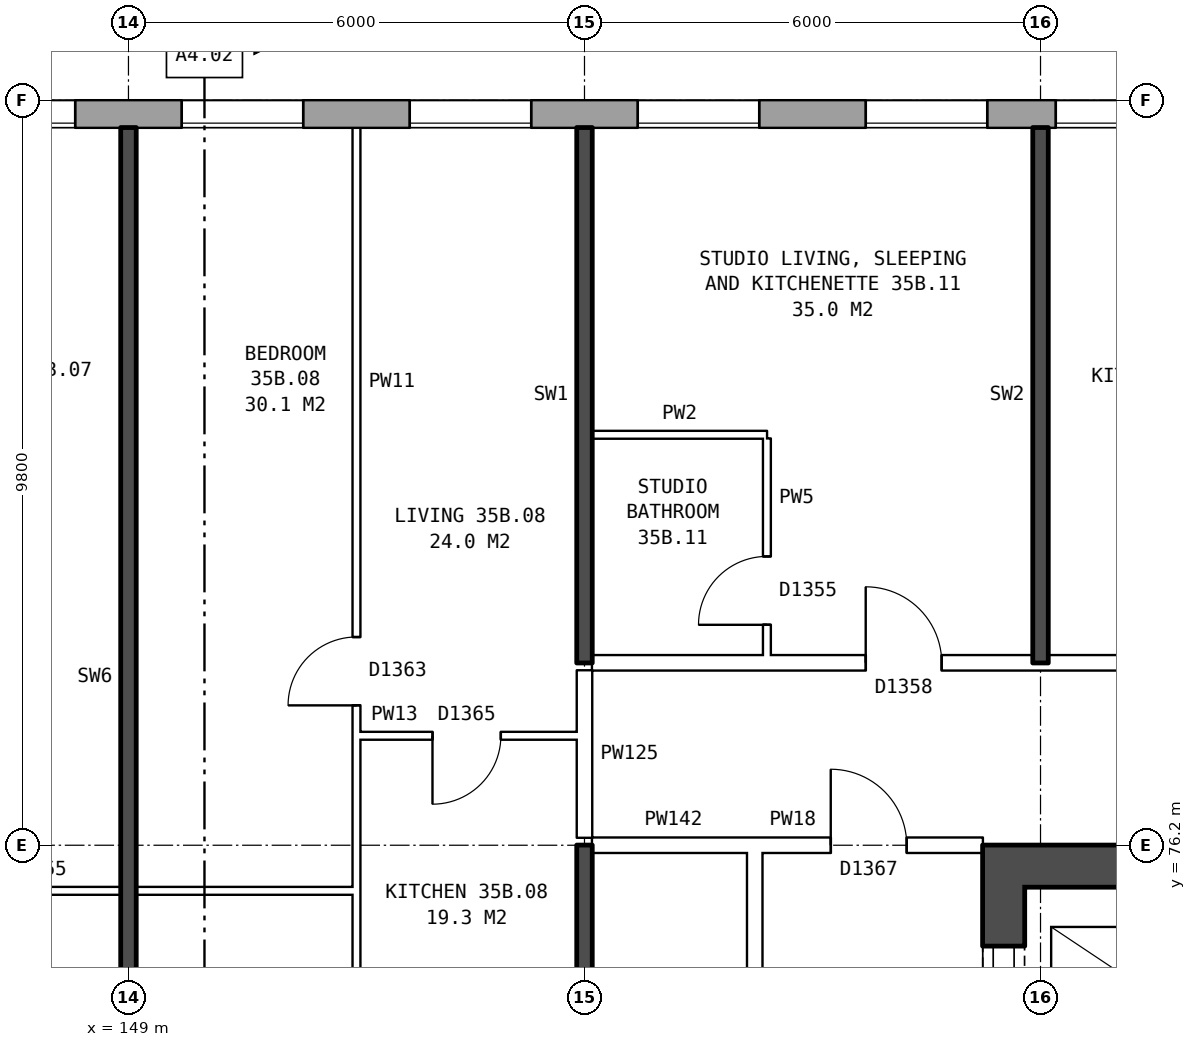
"""IFC4 building model, lengths in metres.
Left out: names, types, materials, properties, quantities, classifications, styles, units other than length and angle.
Written with IfcOpenShell. Run it as: python <this file> out.ifc"""

import sys

from ifc_helpers import new_model, si_unit, direction, frame, frame_2d, origin, place, context, subcontext, project, spatial, rectangle, extrude, element, fill, save


model = new_model("IFC4")
c1 = context("Model", 3, precision=1e-05, world=origin(), true_north=direction((0.0, 1.0)))
c2 = subcontext(c1, "Body", "Model", "MODEL_VIEW")
j1 = project(units=[si_unit("LENGTHUNIT", "METRE"), si_unit("PLANEANGLEUNIT", "RADIAN")], contexts=[c1])
p1 = place(None, origin())
s1 = spatial("IfcSite", under=j1, at=p1, CompositionType="ELEMENT")
p2 = place(p1, origin())
s2 = spatial("IfcBuilding", under=s1, at=p2, CompositionType="ELEMENT")
p3 = place(p2, frame((0.0, 0.0, 126.8)))
s3 = spatial("IfcBuildingStorey", under=s2, at=p3, CompositionType="ELEMENT", Elevation=126.8)
p4 = place(p3, frame((169.675, 85.82, 0.0), z_axis=(0.0, 0.0, 1.0), x_axis=(-1.0, 0.0, 0.0)))
e1 = element("IfcWall", 1, at=p4, inside=s3, PredefinedType="STANDARD", context=c2, shape_type="SweptSolid", body=[
    extrude(rectangle(XDim=35.601, YDim=0.36, at=frame_2d((17.8, 0.0))), origin(), (0.0, 0.0, 1.0), 2.85),
])
p5 = place(p4, frame((0.375, 0.0, 0.8)))
e2 = element("IfcOpeningElement", 2, at=p5, cuts=e1, PredefinedType="OPENING", context=c2, shape_type="SweptSolid", body=[
    extrude(rectangle(XDim=1.6, YDim=1.8, at=frame_2d((0.8, 0.9))), frame((0.0, 0.19, 0.0), z_axis=(0.0, -1.0, 0.0), x_axis=(1.0, 0.0, 0.0)), (0.0, 0.0, 1.0), 0.38),
])
p6 = place(p4, frame((2.875, 0.0, 0.8)))
e3 = element("IfcOpeningElement", 3, at=p6, cuts=e1, PredefinedType="OPENING", context=c2, shape_type="SweptSolid", body=[
    extrude(rectangle(XDim=1.0, YDim=1.8, at=frame_2d((0.5, 0.9))), frame((0.0, 0.19, 0.0), z_axis=(0.0, -1.0, 0.0), x_axis=(1.0, 0.0, 0.0)), (0.0, 0.0, 1.0), 0.38),
])
p7 = place(p4, frame((4.175, 0.0, 1.6)))
e4 = element("IfcOpeningElement", 4, at=p7, cuts=e1, PredefinedType="OPENING", context=c2, shape_type="SweptSolid", body=[
    extrude(rectangle(XDim=0.6, YDim=0.9, at=frame_2d((0.3, 0.45))), frame((0.0, 0.19, 0.0), z_axis=(0.0, -1.0, 0.0), x_axis=(1.0, 0.0, 0.0)), (0.0, 0.0, 1.0), 0.38),
])
p8 = place(p4, frame((9.375, 0.0, 0.8)))
e5 = element("IfcOpeningElement", 5, at=p8, cuts=e1, PredefinedType="OPENING", context=c2, shape_type="SweptSolid", body=[
    extrude(rectangle(XDim=1.6, YDim=1.8, at=frame_2d((0.8, 0.9))), frame((0.0, 0.19, 0.0), z_axis=(0.0, -1.0, 0.0), x_axis=(1.0, 0.0, 0.0)), (0.0, 0.0, 1.0), 0.38),
])
p9 = place(p4, frame((12.375, 0.0, 0.8)))
e6 = element("IfcOpeningElement", 6, at=p9, cuts=e1, PredefinedType="OPENING", context=c2, shape_type="SweptSolid", body=[
    extrude(rectangle(XDim=1.6, YDim=1.8, at=frame_2d((0.8, 0.9))), frame((0.0, 0.19, 0.0), z_axis=(0.0, -1.0, 0.0), x_axis=(1.0, 0.0, 0.0)), (0.0, 0.0, 1.0), 0.38),
])
p10 = place(p4, frame((15.375, 0.0, 0.8)))
e7 = element("IfcOpeningElement", 7, at=p10, cuts=e1, PredefinedType="OPENING", context=c2, shape_type="SweptSolid", body=[
    extrude(rectangle(XDim=1.6, YDim=1.8, at=frame_2d((0.8, 0.9))), frame((0.0, 0.19, 0.0), z_axis=(0.0, -1.0, 0.0), x_axis=(1.0, 0.0, 0.0)), (0.0, 0.0, 1.0), 0.38),
])
p11 = place(p4, frame((18.375, 0.0, 0.8)))
e8 = element("IfcOpeningElement", 8, at=p11, cuts=e1, PredefinedType="OPENING", context=c2, shape_type="SweptSolid", body=[
    extrude(rectangle(XDim=1.6, YDim=1.8, at=frame_2d((0.8, 0.9))), frame((0.0, 0.19, 0.0), z_axis=(0.0, -1.0, 0.0), x_axis=(1.0, 0.0, 0.0)), (0.0, 0.0, 1.0), 0.38),
])
p12 = place(p4, frame((21.375, 0.0, 0.8)))
e9 = element("IfcOpeningElement", 9, at=p12, cuts=e1, PredefinedType="OPENING", context=c2, shape_type="SweptSolid", body=[
    extrude(rectangle(XDim=1.6, YDim=1.8, at=frame_2d((0.8, 0.9))), frame((0.0, 0.19, 0.0), z_axis=(0.0, -1.0, 0.0), x_axis=(1.0, 0.0, 0.0)), (0.0, 0.0, 1.0), 0.38),
])
p13 = place(p4, frame((24.375, 0.0, 0.8)))
e10 = element("IfcOpeningElement", 10, at=p13, cuts=e1, PredefinedType="OPENING", context=c2, shape_type="SweptSolid", body=[
    extrude(rectangle(XDim=1.6, YDim=1.8, at=frame_2d((0.8, 0.9))), frame((0.0, 0.19, 0.0), z_axis=(0.0, -1.0, 0.0), x_axis=(1.0, 0.0, 0.0)), (0.0, 0.0, 1.0), 0.38),
])
p14 = place(p4, frame((27.375, 0.0, 0.8)))
e11 = element("IfcOpeningElement", 11, at=p14, cuts=e1, PredefinedType="OPENING", context=c2, shape_type="SweptSolid", body=[
    extrude(rectangle(XDim=1.6, YDim=1.8, at=frame_2d((0.8, 0.9))), frame((0.0, 0.19, 0.0), z_axis=(0.0, -1.0, 0.0), x_axis=(1.0, 0.0, 0.0)), (0.0, 0.0, 1.0), 0.38),
])
p15 = place(p4, frame((30.675, 0.0, 1.7)))
e12 = element("IfcOpeningElement", 12, at=p15, cuts=e1, PredefinedType="OPENING", context=c2, shape_type="SweptSolid", body=[
    extrude(rectangle(XDim=0.6, YDim=0.9, at=frame_2d((0.3, 0.45))), frame((0.0, 0.19, 0.0), z_axis=(0.0, -1.0, 0.0), x_axis=(1.0, 0.0, 0.0)), (0.0, 0.0, 1.0), 0.38),
])
p16 = place(p4, frame((33.375, 0.0, 0.8)))
e13 = element("IfcOpeningElement", 13, at=p16, cuts=e1, PredefinedType="OPENING", context=c2, shape_type="SweptSolid", body=[
    extrude(rectangle(XDim=1.6, YDim=1.8, at=frame_2d((0.8, 0.9))), frame((0.0, 0.19, 0.0), z_axis=(0.0, -1.0, 0.0), x_axis=(1.0, 0.0, 0.0)), (0.0, 0.0, 1.0), 0.38),
])
p17 = place(p4, frame((5.975, 0.0, 0.8)))
e14 = element("IfcOpeningElement", 14, at=p17, cuts=e1, PredefinedType="OPENING", context=c2, shape_type="SweptSolid", body=[
    extrude(rectangle(XDim=0.6, YDim=0.9, at=frame_2d((0.3, 0.45))), frame((0.0, 0.19, 0.0), z_axis=(0.0, -1.0, 0.0), x_axis=(1.0, 0.0, 0.0)), (0.0, 0.0, 1.0), 0.38),
])
p18 = place(p4, frame((6.875, 0.0, 0.8)))
e15 = element("IfcOpeningElement", 15, at=p18, cuts=e1, PredefinedType="OPENING", context=c2, shape_type="SweptSolid", body=[
    extrude(rectangle(XDim=1.6, YDim=1.8, at=frame_2d((0.8, 0.9))), frame((0.0, 0.19, 0.0), z_axis=(0.0, -1.0, 0.0), x_axis=(1.0, 0.0, 0.0)), (0.0, 0.0, 1.0), 0.38),
])
p19 = place(p4, frame((31.575, 0.0, 0.8)))
e16 = element("IfcOpeningElement", 16, at=p19, cuts=e1, PredefinedType="OPENING", context=c2, shape_type="SweptSolid", body=[
    extrude(rectangle(XDim=0.8, YDim=1.8, at=frame_2d((0.4, 0.9))), frame((0.0, 0.19, 0.0), z_axis=(0.0, -1.0, 0.0), x_axis=(1.0, 0.0, 0.0)), (0.0, 0.0, 1.0), 0.38),
])
p20 = place(p3, frame((160.515, 76.2, 0.0), z_axis=(0.0, 0.0, 1.0), x_axis=(0.0, -1.0, 0.0)))
e17 = element("IfcWall", 17, at=p20, inside=s3, PredefinedType="SHEAR", context=c2, shape_type="SweptSolid", body=[
    extrude(rectangle(XDim=12.4, YDim=0.55, at=frame_2d((6.2, 0.0))), origin(), (0.0, 0.0, 1.0), 2.85),
])
p21 = place(p20, frame((1.325, 0.0, 0.0)))
e18 = element("IfcOpeningElement", 18, at=p21, cuts=e17, PredefinedType="OPENING", context=c2, shape_type="SweptSolid", body=[
    extrude(rectangle(XDim=1.1, YDim=2.1, at=frame_2d((0.55, 1.05))), frame((0.0, 0.285, 0.0), z_axis=(0.0, -1.0, 0.0), x_axis=(1.0, 0.0, 0.0)), (0.0, 0.0, 1.0), 0.57),
])
p22 = place(p20, frame((3.825, 0.0, 0.0)))
e19 = element("IfcOpeningElement", 19, at=p22, cuts=e17, PredefinedType="OPENING", context=c2, shape_type="SweptSolid", body=[
    extrude(rectangle(XDim=0.85, YDim=2.1, at=frame_2d((0.425, 1.05))), frame((0.0, 0.285, 0.0), z_axis=(0.0, -1.0, 0.0), x_axis=(1.0, 0.0, 0.0)), (0.0, 0.0, 1.0), 0.57),
])
p23 = place(p20, frame((5.975, 0.0, 0.0)))
e20 = element("IfcOpeningElement", 20, at=p23, cuts=e17, PredefinedType="OPENING", context=c2, shape_type="SweptSolid", body=[
    extrude(rectangle(XDim=0.85, YDim=2.1, at=frame_2d((0.425, 1.05))), frame((0.0, 0.285, 0.0), z_axis=(0.0, -1.0, 0.0), x_axis=(1.0, 0.0, 0.0)), (0.0, 0.0, 1.0), 0.57),
])
p24 = place(p20, frame((9.9, 0.0, 0.0)))
e21 = element("IfcOpeningElement", 21, at=p24, cuts=e17, PredefinedType="OPENING", context=c2, shape_type="SweptSolid", body=[
    extrude(rectangle(XDim=1.1, YDim=2.1, at=frame_2d((0.55, 1.05))), frame((0.0, 0.285, 0.0), z_axis=(0.0, -1.0, 0.0), x_axis=(1.0, 0.0, 0.0)), (0.0, 0.0, 1.0), 0.57),
])
p25 = place(p20, frame((8.125, 0.0, 0.0)))
e22 = element("IfcOpeningElement", 22, at=p25, cuts=e17, PredefinedType="OPENING", context=c2, shape_type="SweptSolid", body=[
    extrude(rectangle(XDim=0.85, YDim=2.1, at=frame_2d((0.425, 1.05))), frame((0.0, 0.285, 0.0), z_axis=(0.0, -1.0, 0.0), x_axis=(1.0, 0.0, 0.0)), (0.0, 0.0, 1.0), 0.57),
])
p26 = place(p3, frame((160.79, 75.925, 0.0), z_axis=(0.0, 0.0, 1.0), x_axis=(1.0, 0.0, 0.0)))
e23 = element("IfcWall", 23, at=p26, inside=s3, PredefinedType="SHEAR", context=c2, shape_type="SweptSolid", body=[
    extrude(rectangle(XDim=7.3, YDim=0.55, at=frame_2d((3.65, 0.0))), origin(), (0.0, 0.0, 1.0), 2.85),
])
p27 = place(p3, frame((157.24, 63.9, 0.0), z_axis=(0.0, 0.0, 1.0), x_axis=(0.0, 1.0, 0.0)))
e24 = element("IfcWall", 24, at=p27, inside=s3, PredefinedType="PARTITIONING", context=c2, shape_type="SweptSolid", body=[
    extrude(rectangle(XDim=12.2, YDim=0.2, at=frame_2d((6.1, 0.0))), origin(), (0.0, 0.0, 1.0), 2.85),
])
p28 = place(p27, frame((5.1, 0.0, 0.0)))
e25 = element("IfcOpeningElement", 25, at=p28, cuts=e24, PredefinedType="OPENING", context=c2, shape_type="SweptSolid", body=[
    extrude(rectangle(XDim=2.0, YDim=2.1, at=frame_2d((1.0, 1.05))), frame((0.0, 0.11, 0.0), z_axis=(0.0, -1.0, 0.0), x_axis=(1.0, 0.0, 0.0)), (0.0, 0.0, 1.0), 0.22),
])
p29 = place(p3, frame((146.0, 75.6, 0.0), z_axis=(0.0, 0.0, 1.0), x_axis=(1.0, 0.0, 0.0)))
e26 = element("IfcWall", 26, at=p29, inside=s3, PredefinedType="PARTITIONING", context=c2, shape_type="SweptSolid", body=[
    extrude(rectangle(XDim=6.0, YDim=0.1, at=frame_2d((3.0, 0.0))), origin(), (0.0, 0.0, 1.0), 2.85),
])
p30 = place(p3, frame((155.1, 76.2, 0.0), z_axis=(0.0, 0.0, 1.0), x_axis=(1.0, 0.0, 0.0)))
e27 = element("IfcWall", 27, at=p30, inside=s3, PredefinedType="PARTITIONING", context=c2, shape_type="SweptSolid", body=[
    extrude(rectangle(XDim=2.14, YDim=0.2, at=frame_2d((1.07, 0.0))), origin(), (0.0, 0.0, 1.0), 2.85),
])
p31 = place(p3, frame((157.24, 76.2, 0.0), z_axis=(0.0, 0.0, 1.0), x_axis=(1.0, 0.0, 0.0)))
e28 = element("IfcWall", 28, at=p31, inside=s3, PredefinedType="PARTITIONING", context=c2, shape_type="SweptSolid", body=[
    extrude(rectangle(XDim=3.0, YDim=0.2, at=frame_2d((1.5, 0.0))), origin(), (0.0, 0.0, 1.0), 2.85),
])
p32 = place(p31, frame((1.0, 0.0, 0.0)))
e29 = element("IfcOpeningElement", 29, at=p32, cuts=e28, PredefinedType="OPENING", context=c2, shape_type="SweptSolid", body=[
    extrude(rectangle(XDim=1.0, YDim=2.1, at=frame_2d((0.5, 1.05))), frame((0.0, 0.11, 0.0), z_axis=(0.0, -1.0, 0.0), x_axis=(1.0, 0.0, 0.0)), (0.0, 0.0, 1.0), 0.22),
])
p33 = place(p3, frame((152.0, 77.64, 0.0), z_axis=(0.0, 0.0, 1.0), x_axis=(1.0, 0.0, 0.0)))
e30 = element("IfcWall", 30, at=p33, inside=s3, PredefinedType="PARTITIONING", context=c2, shape_type="SweptSolid", body=[
    extrude(rectangle(XDim=2.9, YDim=0.1, at=frame_2d((1.45, 0.0))), origin(), (0.0, 0.0, 1.0), 2.85),
])
p34 = place(p33, frame((1.0, 0.0, 0.0)))
e31 = element("IfcOpeningElement", 31, at=p34, cuts=e30, PredefinedType="OPENING", context=c2, shape_type="SweptSolid", body=[
    extrude(rectangle(XDim=0.9, YDim=2.1, at=frame_2d((0.45, 1.05))), frame((0.0, 0.06, 0.0), z_axis=(0.0, -1.0, 0.0), x_axis=(1.0, 0.0, 0.0)), (0.0, 0.0, 1.0), 0.12),
])
p35 = place(p3, frame((155.1, 78.6, 0.0), z_axis=(0.0, 0.0, 1.0), x_axis=(1.0, 0.0, 0.0)))
e32 = element("IfcWall", 32, at=p35, inside=s3, PredefinedType="PARTITIONING", context=c2, shape_type="SweptSolid", body=[
    extrude(rectangle(XDim=17.29, YDim=0.2, at=frame_2d((8.645, 0.0))), origin(), (0.0, 0.0, 1.0), 2.85),
])
p36 = place(p35, frame((3.6, 0.0, 0.0)))
e33 = element("IfcOpeningElement", 33, at=p36, cuts=e32, PredefinedType="OPENING", context=c2, shape_type="SweptSolid", body=[
    extrude(rectangle(XDim=1.0, YDim=2.1, at=frame_2d((0.5, 1.05))), frame((0.0, 0.11, 0.0), z_axis=(0.0, -1.0, 0.0), x_axis=(1.0, 0.0, 0.0)), (0.0, 0.0, 1.0), 0.22),
])
p37 = place(p35, frame((8.4, 0.0, 0.0)))
e34 = element("IfcOpeningElement", 34, at=p37, cuts=e32, PredefinedType="OPENING", context=c2, shape_type="SweptSolid", body=[
    extrude(rectangle(XDim=1.0, YDim=2.1, at=frame_2d((0.5, 1.05))), frame((0.0, 0.11, 0.0), z_axis=(0.0, -1.0, 0.0), x_axis=(1.0, 0.0, 0.0)), (0.0, 0.0, 1.0), 0.22),
])
p38 = place(p3, frame((155.1, 81.6, 0.0), z_axis=(0.0, 0.0, 1.0), x_axis=(1.0, 0.0, 0.0)))
e35 = element("IfcWall", 35, at=p38, inside=s3, PredefinedType="PARTITIONING", context=c2, shape_type="SweptSolid", body=[
    extrude(rectangle(XDim=2.3, YDim=0.1, at=frame_2d((1.15, 0.0))), origin(), (0.0, 0.0, 1.0), 2.85),
])
p39 = place(p3, frame((149.0, 71.2, 0.0), z_axis=(0.0, 0.0, 1.0), x_axis=(0.0, 1.0, 0.0)))
e36 = element("IfcWall", 36, at=p39, inside=s3, PredefinedType="SOLIDWALL", context=c2, shape_type="SweptSolid", body=[
    extrude(rectangle(XDim=14.44, YDim=0.2, at=frame_2d((7.22, 0.0))), origin(), (0.0, 0.0, 1.0), 2.85),
])
p40 = place(p3, frame((152.0, 71.3, 0.0), z_axis=(0.0, 0.0, 1.0), x_axis=(0.0, 1.0, 0.0)))
e37 = element("IfcWall", 37, at=p40, inside=s3, PredefinedType="PARTITIONING", context=c2, shape_type="SweptSolid", body=[
    extrude(rectangle(XDim=14.34, YDim=0.1, at=frame_2d((7.17, 0.0))), origin(), (0.0, 0.0, 1.0), 2.85),
])
p41 = place(p40, frame((6.74, 0.0, 0.0)))
e38 = element("IfcOpeningElement", 38, at=p41, cuts=e37, PredefinedType="OPENING", context=c2, shape_type="SweptSolid", body=[
    extrude(rectangle(XDim=0.9, YDim=2.1, at=frame_2d((0.45, 1.05))), frame((0.0, 0.06, 0.0), z_axis=(0.0, -1.0, 0.0), x_axis=(1.0, 0.0, 0.0)), (0.0, 0.0, 1.0), 0.12),
])
p42 = place(p40, frame((0.4, 0.0, 0.0)))
e39 = element("IfcOpeningElement", 39, at=p42, cuts=e37, PredefinedType="OPENING", context=c2, shape_type="SweptSolid", body=[
    extrude(rectangle(XDim=0.9, YDim=2.1, at=frame_2d((0.45, 1.05))), frame((0.0, 0.06, 0.0), z_axis=(0.0, -1.0, 0.0), x_axis=(1.0, 0.0, 0.0)), (0.0, 0.0, 1.0), 0.12),
])
p43 = place(p3, frame((155.0, 71.2, 0.0), z_axis=(0.0, 0.0, 1.0), x_axis=(0.0, 1.0, 0.0)))
e40 = element("IfcWall", 40, at=p43, inside=s3, PredefinedType="SOLIDWALL", context=c2, shape_type="SweptSolid", body=[
    extrude(rectangle(XDim=5.0, YDim=0.2, at=frame_2d((2.5, 0.0))), origin(), (0.0, 0.0, 1.0), 2.85),
])
p44 = place(p3, frame((155.0, 76.3, 0.0), z_axis=(0.0, 0.0, 1.0), x_axis=(0.0, 1.0, 0.0)))
e41 = element("IfcWall", 41, at=p44, inside=s3, PredefinedType="PARTITIONING", context=c2, shape_type="SweptSolid", body=[
    extrude(rectangle(XDim=2.2, YDim=0.2, at=frame_2d((1.1, 0.0))), origin(), (0.0, 0.0, 1.0), 2.85),
])
p45 = place(p3, frame((155.0, 78.6, 0.0), z_axis=(0.0, 0.0, 1.0), x_axis=(0.0, 1.0, 0.0)))
e42 = element("IfcWall", 42, at=p45, inside=s3, PredefinedType="SOLIDWALL", context=c2, shape_type="SweptSolid", body=[
    extrude(rectangle(XDim=7.04, YDim=0.2, at=frame_2d((3.52, 0.0))), origin(), (0.0, 0.0, 1.0), 2.85),
])
p46 = place(p3, frame((157.4, 78.7, 0.0), z_axis=(0.0, 0.0, 1.0), x_axis=(0.0, 1.0, 0.0)))
e43 = element("IfcWall", 43, at=p46, inside=s3, PredefinedType="PARTITIONING", context=c2, shape_type="SweptSolid", body=[
    extrude(rectangle(XDim=2.85, YDim=0.1, at=frame_2d((1.425, 0.0))), origin(), (0.0, 0.0, 1.0), 2.85),
])
p47 = place(p46, frame((0.4, 0.0, 0.0)))
e44 = element("IfcOpeningElement", 44, at=p47, cuts=e43, PredefinedType="OPENING", context=c2, shape_type="SweptSolid", body=[
    extrude(rectangle(XDim=0.9, YDim=2.1, at=frame_2d((0.45, 1.05))), frame((0.0, 0.06, 0.0), z_axis=(0.0, -1.0, 0.0), x_axis=(1.0, 0.0, 0.0)), (0.0, 0.0, 1.0), 0.12),
])
p48 = place(p3, frame((161.0, 78.6, 0.0), z_axis=(0.0, 0.0, 1.0), x_axis=(0.0, 1.0, 0.0)))
e45 = element("IfcWall", 45, at=p48, inside=s3, PredefinedType="SOLIDWALL", context=c2, shape_type="SweptSolid", body=[
    extrude(rectangle(XDim=7.04, YDim=0.2, at=frame_2d((3.52, 0.0))), origin(), (0.0, 0.0, 1.0), 2.85),
])
p49 = place(p8, origin())
e46 = element("IfcWindow", 46, at=p49, inside=s3, PartitioningType="SINGLE_PANEL", PredefinedType="WINDOW", context=c2, shape_type="SweptSolid", body=[
    extrude(rectangle(XDim=1.6, YDim=1.8, at=frame_2d((0.8, 0.9))), frame((0.0, 0.15, 0.0), z_axis=(0.0, -1.0, 0.0), x_axis=(1.0, 0.0, 0.0)), (0.0, 0.0, 1.0), 0.06),
])
fill(e5, e46)
p50 = place(p9, origin())
e47 = element("IfcWindow", 47, at=p50, inside=s3, PartitioningType="SINGLE_PANEL", PredefinedType="WINDOW", context=c2, shape_type="SweptSolid", body=[
    extrude(rectangle(XDim=1.6, YDim=1.8, at=frame_2d((0.8, 0.9))), frame((0.0, 0.15, 0.0), z_axis=(0.0, -1.0, 0.0), x_axis=(1.0, 0.0, 0.0)), (0.0, 0.0, 1.0), 0.06),
])
fill(e6, e47)
p51 = place(p10, origin())
e48 = element("IfcWindow", 48, at=p51, inside=s3, PartitioningType="SINGLE_PANEL", PredefinedType="WINDOW", context=c2, shape_type="SweptSolid", body=[
    extrude(rectangle(XDim=1.6, YDim=1.8, at=frame_2d((0.8, 0.9))), frame((0.0, 0.15, 0.0), z_axis=(0.0, -1.0, 0.0), x_axis=(1.0, 0.0, 0.0)), (0.0, 0.0, 1.0), 0.06),
])
fill(e7, e48)
p52 = place(p11, origin())
e49 = element("IfcWindow", 49, at=p52, inside=s3, PartitioningType="SINGLE_PANEL", PredefinedType="WINDOW", context=c2, shape_type="SweptSolid", body=[
    extrude(rectangle(XDim=1.6, YDim=1.8, at=frame_2d((0.8, 0.9))), frame((0.0, 0.15, 0.0), z_axis=(0.0, -1.0, 0.0), x_axis=(1.0, 0.0, 0.0)), (0.0, 0.0, 1.0), 0.06),
])
fill(e8, e49)
p53 = place(p12, origin())
e50 = element("IfcWindow", 50, at=p53, inside=s3, PartitioningType="SINGLE_PANEL", PredefinedType="WINDOW", context=c2, shape_type="SweptSolid", body=[
    extrude(rectangle(XDim=1.6, YDim=1.8, at=frame_2d((0.8, 0.9))), frame((0.0, 0.15, 0.0), z_axis=(0.0, -1.0, 0.0), x_axis=(1.0, 0.0, 0.0)), (0.0, 0.0, 1.0), 0.06),
])
fill(e9, e50)
p54 = place(p21, origin())
e51 = element("IfcDoor", 51, at=p54, inside=s3, OperationType="DOUBLE_DOOR_SLIDING", PredefinedType="DOOR", context=c2, shape_type="SweptSolid", body=[
    extrude(rectangle(XDim=1.1, YDim=2.1, at=frame_2d((0.55, 1.05))), frame((0.0, 0.26, 0.0), z_axis=(0.0, -1.0, 0.0), x_axis=(1.0, 0.0, 0.0)), (0.0, 0.0, 1.0), 0.05),
])
fill(e18, e51)
p55 = place(p32, origin())
e52 = element("IfcDoor", 52, at=p55, inside=s3, OperationType="SINGLE_SWING_LEFT", PredefinedType="DOOR", context=c2, shape_type="SweptSolid", body=[
    extrude(rectangle(XDim=1.0, YDim=2.1, at=frame_2d((0.5, 1.05))), frame((0.0, 0.025, 0.0), z_axis=(0.0, -1.0, 0.0), x_axis=(1.0, 0.0, 0.0)), (0.0, 0.0, 1.0), 0.05),
])
fill(e29, e52)
p56 = place(p41, origin())
e53 = element("IfcDoor", 53, at=p56, inside=s3, OperationType="SINGLE_SWING_LEFT", PredefinedType="DOOR", context=c2, shape_type="SweptSolid", body=[
    extrude(rectangle(XDim=0.9, YDim=2.1, at=frame_2d((0.45, 1.05))), frame((0.0, 0.025, 0.0), z_axis=(0.0, -1.0, 0.0), x_axis=(1.0, 0.0, 0.0)), (0.0, 0.0, 1.0), 0.05),
])
fill(e38, e53)
p57 = place(p34, frame((0.9, 0.0, 0.0), z_axis=(0.0, 0.0, 1.0), x_axis=(-1.0, 0.0, 0.0)))
e54 = element("IfcDoor", 54, at=p57, inside=s3, OperationType="SINGLE_SWING_RIGHT", PredefinedType="DOOR", context=c2, shape_type="SweptSolid", body=[
    extrude(rectangle(XDim=0.9, YDim=2.1, at=frame_2d((0.45, 1.05))), frame((0.0, 0.025, 0.0), z_axis=(0.0, -1.0, 0.0), x_axis=(1.0, 0.0, 0.0)), (0.0, 0.0, 1.0), 0.05),
])
fill(e31, e54)
p58 = place(p36, origin())
e55 = element("IfcDoor", 55, at=p58, inside=s3, OperationType="SINGLE_SWING_LEFT", PredefinedType="DOOR", context=c2, shape_type="SweptSolid", body=[
    extrude(rectangle(XDim=1.0, YDim=2.1, at=frame_2d((0.5, 1.05))), frame((0.0, 0.025, 0.0), z_axis=(0.0, -1.0, 0.0), x_axis=(1.0, 0.0, 0.0)), (0.0, 0.0, 1.0), 0.05),
])
fill(e33, e55)
p59 = place(p47, origin())
e56 = element("IfcDoor", 56, at=p59, inside=s3, OperationType="SINGLE_SWING_LEFT", PredefinedType="DOOR", context=c2, shape_type="SweptSolid", body=[
    extrude(rectangle(XDim=0.9, YDim=2.1, at=frame_2d((0.45, 1.05))), frame((0.0, 0.025, 0.0), z_axis=(0.0, -1.0, 0.0), x_axis=(1.0, 0.0, 0.0)), (0.0, 0.0, 1.0), 0.05),
])
fill(e44, e56)
p60 = place(p18, origin())
e57 = element("IfcWindow", 57, at=p60, inside=s3, PartitioningType="SINGLE_PANEL", PredefinedType="WINDOW", context=c2, shape_type="SweptSolid", body=[
    extrude(rectangle(XDim=1.6, YDim=1.8, at=frame_2d((0.8, 0.9))), frame((0.0, 0.15, 0.0), z_axis=(0.0, -1.0, 0.0), x_axis=(1.0, 0.0, 0.0)), (0.0, 0.0, 1.0), 0.06),
])
fill(e15, e57)
save(model, sys.argv[1])
